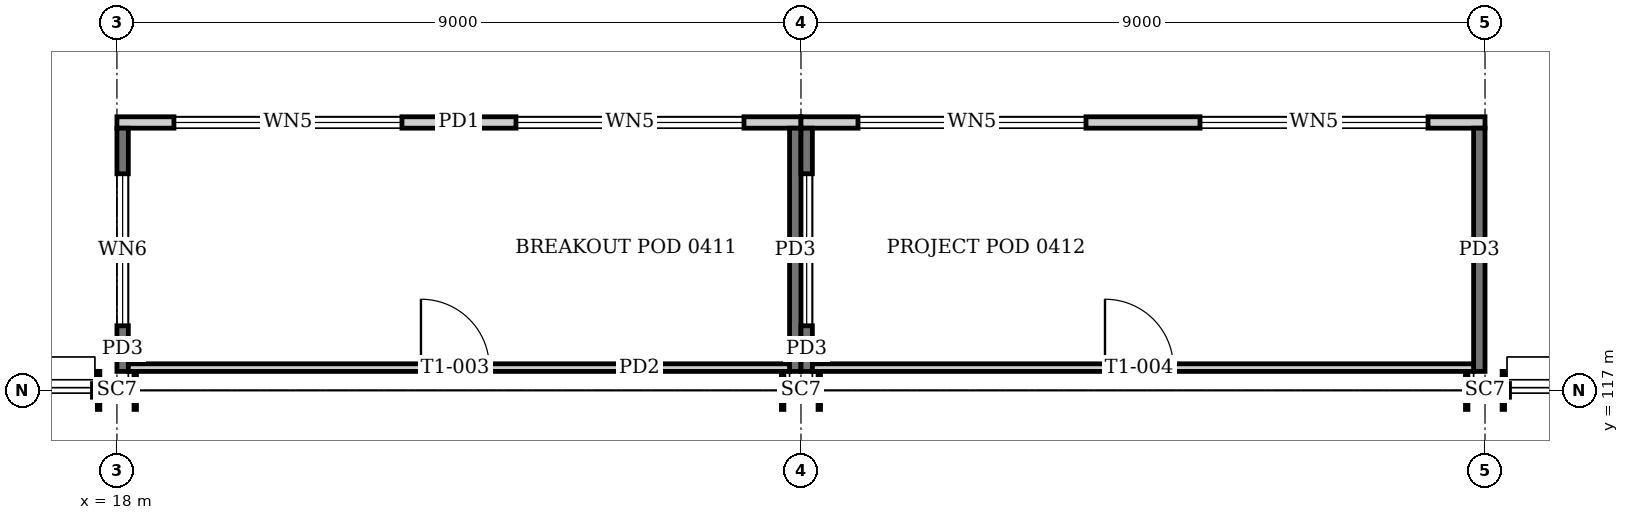
"""IFC4 building model, lengths in metres.
Left out: names, types, materials, properties, quantities, classifications, styles, units other than length and angle.
Written with IfcOpenShell. Run it as: python <this file> out.ifc"""

import sys

from ifc_helpers import new_model, si_unit, direction, frame, frame_2d, origin, origin_2d, place, context, subcontext, project, spatial, rectangle, i_section, extrude, element, fill, save


model = new_model("IFC4")
c1 = context("Model", 3, precision=1e-05, world=origin(), true_north=direction((0.0, 1.0)))
c2 = subcontext(c1, "Body", "Model", "MODEL_VIEW")
j1 = project(units=[si_unit("LENGTHUNIT", "METRE"), si_unit("PLANEANGLEUNIT", "RADIAN")], contexts=[c1])
p1 = place(None, origin())
s1 = spatial("IfcSite", under=j1, at=p1, CompositionType="ELEMENT")
p2 = place(p1, origin())
s2 = spatial("IfcBuilding", under=s1, at=p2, CompositionType="ELEMENT")
p3 = place(p2, frame((0.0, 0.0, 19.2)))
s3 = spatial("IfcBuildingStorey", under=s2, at=p3, CompositionType="ELEMENT", Elevation=19.2)
for number, where, z_axis, x_axis in (
    (1, (18.0, 117.0, 0.0), (0.0, 0.0, 1.0), (0.0, 1.0, 0.0)),
    (2, (27.0, 117.0, 0.0), (0.0, 0.0, 1.0), (0.0, 1.0, 0.0)),
    (3, (36.0, 117.0, 0.0), (0.0, 0.0, 1.0), (0.0, 1.0, 0.0)),
):
    element("IfcColumn", number, at=place(p3, frame(where, z_axis=z_axis, x_axis=x_axis)), inside=s3, PredefinedType="COLUMN", context=c2, shape_type="SweptSolid", body=[
        extrude(i_section(OverallWidth=0.5, OverallDepth=0.514, WebThickness=0.025, FlangeThickness=0.032, at=origin_2d()), origin(), (0.0, 0.0, 1.0), 4.0),
    ])
p4 = place(p3, frame((18.0, 120.525, 0.0), z_axis=(0.0, 0.0, 1.0), x_axis=(1.0, 0.0, 0.0)))
e4 = element("IfcWall", 4, at=p4, inside=s3, PredefinedType="SOLIDWALL", context=c2, shape_type="SweptSolid", body=[
    extrude(rectangle(XDim=9.0, YDim=0.15, at=frame_2d((4.5, 0.0))), origin(), (0.0, 0.0, 1.0), 2.6),
])
p5 = place(p4, frame((0.75, 0.0, 0.9)))
e5 = element("IfcOpeningElement", 5, at=p5, cuts=e4, PredefinedType="OPENING", context=c2, shape_type="SweptSolid", body=[
    extrude(rectangle(XDim=3.0, YDim=1.4, at=frame_2d((1.5, 0.7))), frame((0.0, 0.085, 0.0), z_axis=(0.0, -1.0, 0.0), x_axis=(1.0, 0.0, 0.0)), (0.0, 0.0, 1.0), 0.17),
])
p6 = place(p4, frame((5.25, 0.0, 0.9)))
e6 = element("IfcOpeningElement", 6, at=p6, cuts=e4, PredefinedType="OPENING", context=c2, shape_type="SweptSolid", body=[
    extrude(rectangle(XDim=3.0, YDim=1.4, at=frame_2d((1.5, 0.7))), frame((0.0, 0.085, 0.0), z_axis=(0.0, -1.0, 0.0), x_axis=(1.0, 0.0, 0.0)), (0.0, 0.0, 1.0), 0.17),
])
p7 = place(p3, frame((18.075, 120.45, -0.15), z_axis=(0.0, 0.0, 1.0), x_axis=(0.0, -1.0, 0.0)))
e7 = element("IfcWall", 7, at=p7, inside=s3, PredefinedType="SOLIDWALL", context=c2, shape_type="SweptSolid", body=[
    extrude(rectangle(XDim=3.2, YDim=0.15, at=frame_2d((1.6, 0.0))), origin(), (0.0, 0.0, 1.0), 2.75),
])
p8 = place(p7, frame((0.6, 0.0, 1.05)))
e8 = element("IfcOpeningElement", 8, at=p8, cuts=e7, PredefinedType="OPENING", context=c2, shape_type="SweptSolid", body=[
    extrude(rectangle(XDim=2.0, YDim=1.4, at=frame_2d((1.0, 0.7))), frame((0.0, 0.085, 0.0), z_axis=(0.0, -1.0, 0.0), x_axis=(1.0, 0.0, 0.0)), (0.0, 0.0, 1.0), 0.17),
])
p9 = place(p3, frame((26.925, 120.45, -0.15), z_axis=(0.0, 0.0, 1.0), x_axis=(0.0, -1.0, 0.0)))
e9 = element("IfcWall", 9, at=p9, inside=s3, PredefinedType="SOLIDWALL", context=c2, shape_type="SweptSolid", body=[
    extrude(rectangle(XDim=3.2, YDim=0.15, at=frame_2d((1.6, 0.0))), origin(), (0.0, 0.0, 1.0), 2.75),
])
p10 = place(p3, frame((18.15, 117.3, 0.0), z_axis=(0.0, 0.0, 1.0), x_axis=(1.0, 0.0, 0.0)))
e10 = element("IfcWall", 10, at=p10, inside=s3, PredefinedType="PARTITIONING", context=c2, shape_type="SweptSolid", body=[
    extrude(rectangle(XDim=8.7, YDim=0.1, at=frame_2d((4.35, 0.0))), origin(), (0.0, 0.0, 1.0), 2.6),
])
p11 = place(p10, frame((3.85, 0.0, 0.0)))
e11 = element("IfcOpeningElement", 11, at=p11, cuts=e10, PredefinedType="OPENING", context=c2, shape_type="SweptSolid", body=[
    extrude(rectangle(XDim=0.9, YDim=2.1, at=frame_2d((0.45, 1.05))), frame((0.0, 0.06, 0.0), z_axis=(0.0, -1.0, 0.0), x_axis=(1.0, 0.0, 0.0)), (0.0, 0.0, 1.0), 0.12),
])
p12 = place(p3, frame((27.0, 120.525, 0.0), z_axis=(0.0, 0.0, 1.0), x_axis=(1.0, 0.0, 0.0)))
e12 = element("IfcWall", 12, at=p12, inside=s3, PredefinedType="SOLIDWALL", context=c2, shape_type="SweptSolid", body=[
    extrude(rectangle(XDim=9.0, YDim=0.15, at=frame_2d((4.5, 0.0))), origin(), (0.0, 0.0, 1.0), 2.6),
])
p13 = place(p12, frame((0.75, 0.0, 0.9)))
e13 = element("IfcOpeningElement", 13, at=p13, cuts=e12, PredefinedType="OPENING", context=c2, shape_type="SweptSolid", body=[
    extrude(rectangle(XDim=3.0, YDim=1.4, at=frame_2d((1.5, 0.7))), frame((0.0, 0.085, 0.0), z_axis=(0.0, -1.0, 0.0), x_axis=(1.0, 0.0, 0.0)), (0.0, 0.0, 1.0), 0.17),
])
p14 = place(p12, frame((5.25, 0.0, 0.9)))
e14 = element("IfcOpeningElement", 14, at=p14, cuts=e12, PredefinedType="OPENING", context=c2, shape_type="SweptSolid", body=[
    extrude(rectangle(XDim=3.0, YDim=1.4, at=frame_2d((1.5, 0.7))), frame((0.0, 0.085, 0.0), z_axis=(0.0, -1.0, 0.0), x_axis=(1.0, 0.0, 0.0)), (0.0, 0.0, 1.0), 0.17),
])
p15 = place(p3, frame((27.075, 120.45, -0.15), z_axis=(0.0, 0.0, 1.0), x_axis=(0.0, -1.0, 0.0)))
e15 = element("IfcWall", 15, at=p15, inside=s3, PredefinedType="SOLIDWALL", context=c2, shape_type="SweptSolid", body=[
    extrude(rectangle(XDim=3.2, YDim=0.15, at=frame_2d((1.6, 0.0))), origin(), (0.0, 0.0, 1.0), 2.75),
])
p16 = place(p15, frame((0.6, 0.0, 1.05)))
e16 = element("IfcOpeningElement", 16, at=p16, cuts=e15, PredefinedType="OPENING", context=c2, shape_type="SweptSolid", body=[
    extrude(rectangle(XDim=2.0, YDim=1.4, at=frame_2d((1.0, 0.7))), frame((0.0, 0.085, 0.0), z_axis=(0.0, -1.0, 0.0), x_axis=(1.0, 0.0, 0.0)), (0.0, 0.0, 1.0), 0.17),
])
p17 = place(p3, frame((35.925, 120.45, -0.15), z_axis=(0.0, 0.0, 1.0), x_axis=(0.0, -1.0, 0.0)))
e17 = element("IfcWall", 17, at=p17, inside=s3, PredefinedType="SOLIDWALL", context=c2, shape_type="SweptSolid", body=[
    extrude(rectangle(XDim=3.2, YDim=0.15, at=frame_2d((1.6, 0.0))), origin(), (0.0, 0.0, 1.0), 2.75),
])
p18 = place(p3, frame((27.15, 117.3, 0.0), z_axis=(0.0, 0.0, 1.0), x_axis=(1.0, 0.0, 0.0)))
e18 = element("IfcWall", 18, at=p18, inside=s3, PredefinedType="PARTITIONING", context=c2, shape_type="SweptSolid", body=[
    extrude(rectangle(XDim=8.7, YDim=0.1, at=frame_2d((4.35, 0.0))), origin(), (0.0, 0.0, 1.0), 2.6),
])
p19 = place(p18, frame((3.85, 0.0, 0.0)))
e19 = element("IfcOpeningElement", 19, at=p19, cuts=e18, PredefinedType="OPENING", context=c2, shape_type="SweptSolid", body=[
    extrude(rectangle(XDim=0.9, YDim=2.1, at=frame_2d((0.45, 1.05))), frame((0.0, 0.06, 0.0), z_axis=(0.0, -1.0, 0.0), x_axis=(1.0, 0.0, 0.0)), (0.0, 0.0, 1.0), 0.12),
])
p20 = place(p5, origin())
e20 = element("IfcWindow", 20, at=p20, inside=s3, PartitioningType="SINGLE_PANEL", PredefinedType="WINDOW", context=c2, shape_type="SweptSolid", body=[
    extrude(rectangle(XDim=3.0, YDim=1.4, at=frame_2d((1.5, 0.7))), frame((0.0, 0.03, 0.0), z_axis=(0.0, -1.0, 0.0), x_axis=(1.0, 0.0, 0.0)), (0.0, 0.0, 1.0), 0.06),
])
fill(e5, e20)
p21 = place(p6, origin())
e21 = element("IfcWindow", 21, at=p21, inside=s3, PartitioningType="SINGLE_PANEL", PredefinedType="WINDOW", context=c2, shape_type="SweptSolid", body=[
    extrude(rectangle(XDim=3.0, YDim=1.4, at=frame_2d((1.5, 0.7))), frame((0.0, 0.03, 0.0), z_axis=(0.0, -1.0, 0.0), x_axis=(1.0, 0.0, 0.0)), (0.0, 0.0, 1.0), 0.06),
])
fill(e6, e21)
p22 = place(p8, origin())
e22 = element("IfcWindow", 22, at=p22, inside=s3, PartitioningType="SINGLE_PANEL", PredefinedType="WINDOW", context=c2, shape_type="SweptSolid", body=[
    extrude(rectangle(XDim=2.0, YDim=1.4, at=frame_2d((1.0, 0.7))), frame((0.0, 0.03, 0.0), z_axis=(0.0, -1.0, 0.0), x_axis=(1.0, 0.0, 0.0)), (0.0, 0.0, 1.0), 0.06),
])
fill(e8, e22)
p23 = place(p11, origin())
e23 = element("IfcDoor", 23, at=p23, inside=s3, OperationType="SINGLE_SWING_LEFT", PredefinedType="DOOR", context=c2, shape_type="SweptSolid", body=[
    extrude(rectangle(XDim=0.9, YDim=2.1, at=frame_2d((0.45, 1.05))), frame((0.0, 0.025, 0.0), z_axis=(0.0, -1.0, 0.0), x_axis=(1.0, 0.0, 0.0)), (0.0, 0.0, 1.0), 0.05),
])
fill(e11, e23)
p24 = place(p13, origin())
e24 = element("IfcWindow", 24, at=p24, inside=s3, PartitioningType="SINGLE_PANEL", PredefinedType="WINDOW", context=c2, shape_type="SweptSolid", body=[
    extrude(rectangle(XDim=3.0, YDim=1.4, at=frame_2d((1.5, 0.7))), frame((0.0, 0.03, 0.0), z_axis=(0.0, -1.0, 0.0), x_axis=(1.0, 0.0, 0.0)), (0.0, 0.0, 1.0), 0.06),
])
fill(e13, e24)
p25 = place(p14, origin())
e25 = element("IfcWindow", 25, at=p25, inside=s3, PartitioningType="SINGLE_PANEL", PredefinedType="WINDOW", context=c2, shape_type="SweptSolid", body=[
    extrude(rectangle(XDim=3.0, YDim=1.4, at=frame_2d((1.5, 0.7))), frame((0.0, 0.03, 0.0), z_axis=(0.0, -1.0, 0.0), x_axis=(1.0, 0.0, 0.0)), (0.0, 0.0, 1.0), 0.06),
])
fill(e14, e25)
p26 = place(p16, origin())
e26 = element("IfcWindow", 26, at=p26, inside=s3, PartitioningType="SINGLE_PANEL", PredefinedType="WINDOW", context=c2, shape_type="SweptSolid", body=[
    extrude(rectangle(XDim=2.0, YDim=1.4, at=frame_2d((1.0, 0.7))), frame((0.0, 0.03, 0.0), z_axis=(0.0, -1.0, 0.0), x_axis=(1.0, 0.0, 0.0)), (0.0, 0.0, 1.0), 0.06),
])
fill(e16, e26)
p27 = place(p19, origin())
e27 = element("IfcDoor", 27, at=p27, inside=s3, OperationType="SINGLE_SWING_LEFT", PredefinedType="DOOR", context=c2, shape_type="SweptSolid", body=[
    extrude(rectangle(XDim=0.9, YDim=2.1, at=frame_2d((0.45, 1.05))), frame((0.0, 0.025, 0.0), z_axis=(0.0, -1.0, 0.0), x_axis=(1.0, 0.0, 0.0)), (0.0, 0.0, 1.0), 0.05),
])
fill(e19, e27)
save(model, sys.argv[1])
